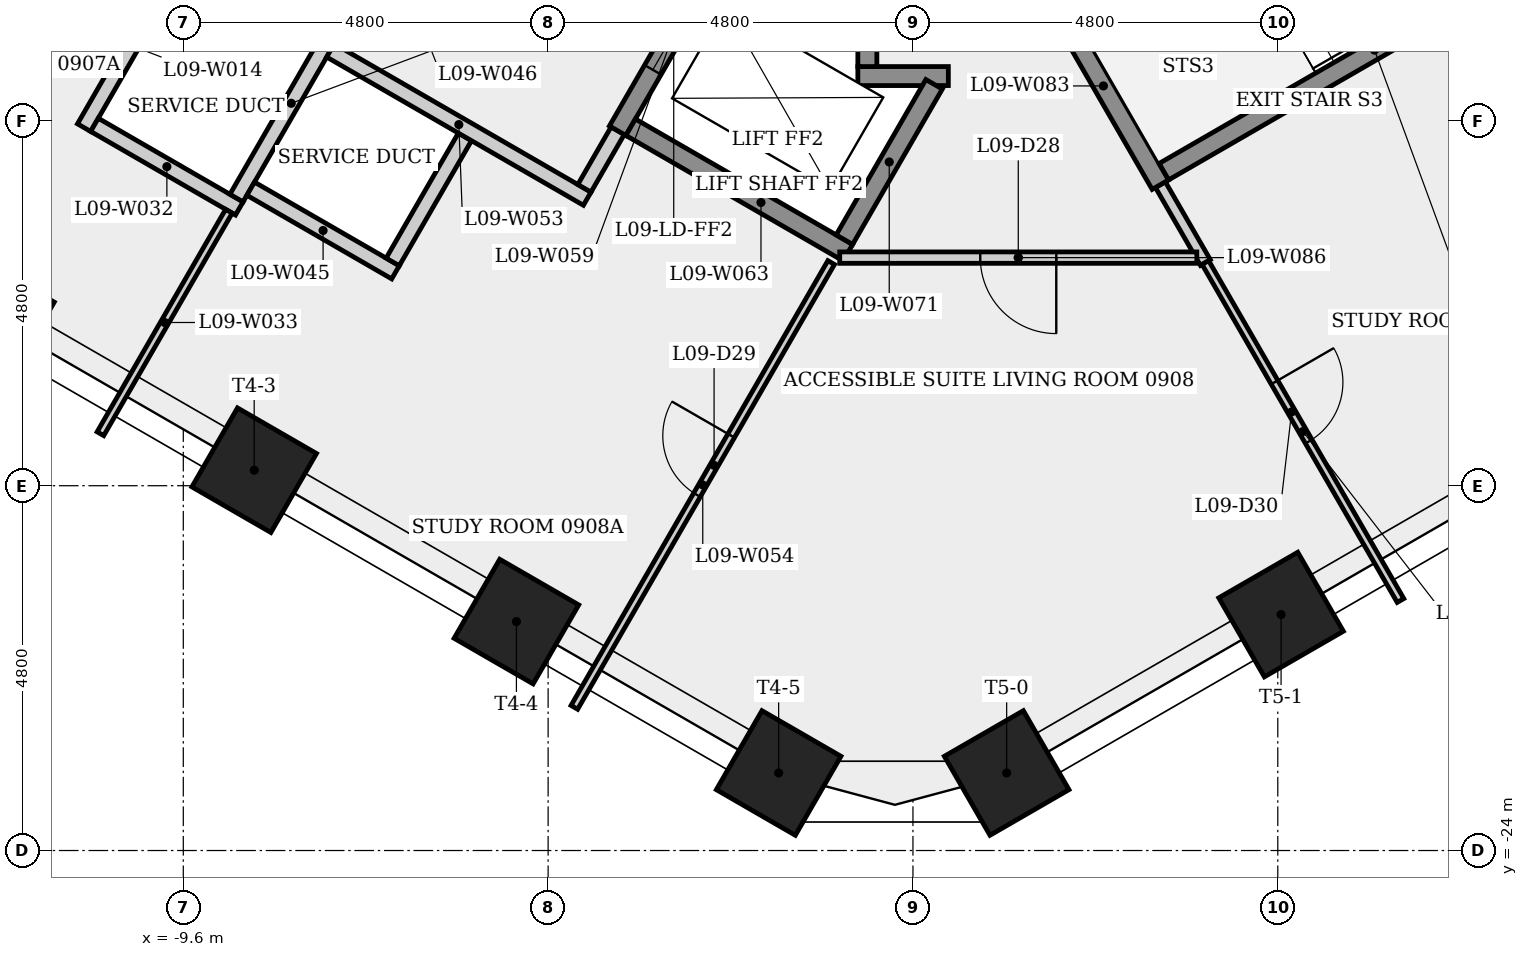
"""IFC4 building model, lengths in metres.
Left out: names, types, materials, properties, quantities, classifications, styles, units other than length and angle.
Written with IfcOpenShell. Run it as: python <this file> out.ifc"""

import sys

from ifc_helpers import new_model, si_unit, direction, frame, frame_2d, origin, origin_2d, place, context, subcontext, project, spatial, rectangle, extrude, element, fill, save


model = new_model("IFC4")
c1 = context("Model", 3, precision=1e-05, world=origin(), true_north=direction((0.0, 1.0)))
c2 = subcontext(c1, "Body", "Model", "MODEL_VIEW")
j1 = project(units=[si_unit("LENGTHUNIT", "METRE"), si_unit("PLANEANGLEUNIT", "RADIAN")], contexts=[c1])
p1 = place(None, origin())
s1 = spatial("IfcSite", under=j1, at=p1, CompositionType="ELEMENT")
p2 = place(p1, origin())
s2 = spatial("IfcBuilding", under=s1, at=p2, CompositionType="ELEMENT")
p3 = place(p2, frame((0.0, 0.0, 39.1)))
s3 = spatial("IfcBuildingStorey", under=s2, at=p3, CompositionType="ELEMENT", Elevation=39.1)
for number, where, z_axis, x_axis in (
    (1, (-12.117, -17.004, 0.0), (0.0, 0.0, 1.0), (-0.5, -0.866, 0.0)),
    (2, (-8.667, -18.996, 0.0), (0.0, 0.0, 1.0), (-0.5, -0.866, 0.0)),
    (3, (-5.217, -20.988, 0.0), (0.0, 0.0, 1.0), (-0.5, -0.866, 0.0)),
    (4, (-1.767, -22.98, 0.0), (0.0, 0.0, 1.0), (-0.5, -0.866, 0.0)),
    (5, (1.233, -22.98, 0.0), (0.0, 0.0, 1.0), (0.5, -0.866, 0.0)),
    (6, (4.843, -20.895, 0.0), (0.0, 0.0, 1.0), (0.5, -0.866, 0.0)),
):
    element("IfcColumn", number, at=place(p3, frame(where, z_axis=z_axis, x_axis=x_axis)), inside=s3, PredefinedType="COLUMN", context=c2, shape_type="SweptSolid", body=[
        extrude(rectangle(XDim=1.2, YDim=1.2, at=origin_2d()), origin(), (0.0, 0.0, 1.0), 3.4),
    ])
p4 = place(p3, frame((-10.905, -14.489, 0.0), z_axis=(0.0, 0.0, 1.0), x_axis=(0.499959856469, 0.866048579423, 0.0)))
e7 = element("IfcWall", 7, at=p4, inside=s3, PredefinedType="PLUMBINGWALL", context=c2, shape_type="SweptSolid", body=[
    extrude(rectangle(XDim=3.175, YDim=0.2, at=frame_2d((1.587, 0.0))), origin(), (0.0, 0.0, 1.0), 3.05),
])
p5 = place(p3, frame((-8.863, -15.552, 0.0), z_axis=(0.0, 0.0, 1.0), x_axis=(-0.866035918664, 0.499981787252, 0.0)))
e8 = element("IfcWall", 8, at=p5, inside=s3, PredefinedType="PLUMBINGWALL", context=c2, shape_type="SweptSolid", body=[
    extrude(rectangle(XDim=2.2, YDim=0.2, at=frame_2d((1.1, 0.0))), origin(), (0.0, 0.0, 1.0), 3.05),
])
p6 = place(p3, frame((-9.0, -15.588, 0.0), z_axis=(0.0, 0.0, 1.0), x_axis=(-0.499968344795, -0.866043679154, 0.0)))
e9 = element("IfcWall", 9, at=p6, inside=s3, PredefinedType="PARTITIONING", context=c2, shape_type="SweptSolid", body=[
    extrude(rectangle(XDim=3.381, YDim=0.1, at=frame_2d((1.69, 0.0))), origin(), (0.0, 0.0, 1.0), 3.05),
])
p7 = place(p3, frame((-7.7, -13.337, 0.0), z_axis=(0.0, 0.0, 1.0), x_axis=(-0.500001309137, -0.866024647952, 0.0)))
e10 = element("IfcWall", 10, at=p7, inside=s3, PredefinedType="PLUMBINGWALL", context=c2, shape_type="SweptSolid", body=[
    extrude(rectangle(XDim=2.4, YDim=0.2, at=frame_2d((1.2, 0.0))), origin(), (0.0, 0.0, 1.0), 3.05),
])
p8 = place(p3, frame((-6.808, -16.392, 0.0), z_axis=(0.0, 0.0, 1.0), x_axis=(-0.866008176907, 0.50002983664, 0.0)))
e11 = element("IfcWall", 11, at=p8, inside=s3, PredefinedType="PLUMBINGWALL", context=c2, shape_type="SweptSolid", body=[
    extrude(rectangle(XDim=2.2, YDim=0.2, at=frame_2d((1.1, 0.0))), origin(), (0.0, 0.0, 1.0), 3.05),
])
p9 = place(p3, frame((-5.895, -14.61, 0.0), z_axis=(0.0, 0.0, 1.0), x_axis=(-0.500022797313, -0.86601224135, 0.0)))
e12 = element("IfcWall", 12, at=p9, inside=s3, PredefinedType="PLUMBINGWALL", context=c2, shape_type="SweptSolid", body=[
    extrude(rectangle(XDim=1.9, YDim=0.2, at=frame_2d((0.95, 0.0))), origin(), (0.0, 0.0, 1.0), 3.05),
])
p10 = place(p3, frame((-4.286, -15.423, 0.0), z_axis=(0.0, 0.0, 1.0), x_axis=(-0.866042777325, 0.499969906938, 0.0)))
e13 = element("IfcWall", 13, at=p10, inside=s3, PredefinedType="PARTITIONING", context=c2, shape_type="SweptSolid", body=[
    extrude(rectangle(XDim=3.9, YDim=0.2, at=frame_2d((1.95, 0.0))), origin(), (0.0, 0.0, 1.0), 3.05),
])
p11 = place(p3, frame((-4.455, -22.116, 0.0), z_axis=(0.0, 0.0, 1.0), x_axis=(0.499982026803, 0.866035780366, 0.0)))
e14 = element("IfcWall", 14, at=p11, inside=s3, PredefinedType="PARTITIONING", context=c2, shape_type="SweptSolid", body=[
    extrude(rectangle(XDim=6.758, YDim=0.1, at=frame_2d((3.379, 0.0))), origin(), (0.0, 0.0, 1.0), 3.05),
])
p12 = place(p11, frame((3.227, 0.0, 0.0)))
e15 = element("IfcOpeningElement", 15, at=p12, cuts=e14, PredefinedType="OPENING", context=c2, shape_type="SweptSolid", body=[
    extrude(rectangle(XDim=0.9, YDim=2.1, at=frame_2d((0.45, 1.05))), frame((0.0, 0.06, 0.0), z_axis=(0.0, -1.0, 0.0), x_axis=(1.0, 0.0, 0.0)), (0.0, 0.0, 1.0), 0.12),
])
p13 = place(p3, frame((-3.885, -14.529, 0.0), z_axis=(0.0, 0.0, 1.0), x_axis=(-0.499859285417, -0.866106630146, 0.0)))
e16 = element("IfcWall", 16, at=p13, inside=s3, PredefinedType="PARTITIONING", context=c2, shape_type="SweptSolid", body=[
    extrude(rectangle(XDim=0.875, YDim=0.2, at=frame_2d((0.438, 0.0))), origin(), (0.0, 0.0, 1.0), 3.05),
])
p14 = place(p3, frame((-2.41, -11.974, 0.0), z_axis=(0.0, 0.0, 1.0), x_axis=(-0.500001826776, -0.866024349092, 0.0)))
e17 = element("IfcWall", 17, at=p14, inside=s3, PredefinedType="SHEAR", context=c2, shape_type="SweptSolid", body=[
    extrude(rectangle(XDim=2.95, YDim=0.25, at=frame_2d((1.475, 0.0))), origin(), (0.0, 0.0, 1.0), 3.05),
])
p15 = place(p14, frame((0.925, 0.0, 0.0)))
e18 = element("IfcOpeningElement", 18, at=p15, cuts=e17, PredefinedType="OPENING", context=c2, shape_type="SweptSolid", body=[
    extrude(rectangle(XDim=1.1, YDim=2.1, at=frame_2d((0.55, 1.05))), frame((0.0, 0.135, 0.0), z_axis=(0.0, -1.0, 0.0), x_axis=(1.0, 0.0, 0.0)), (0.0, 0.0, 1.0), 0.27),
])
p16 = place(p3, frame((-0.856, -16.133, 0.0), z_axis=(0.0, 0.0, 1.0), x_axis=(-0.866021716278, 0.500006386895, 0.0)))
e19 = element("IfcWall", 19, at=p16, inside=s3, PredefinedType="SHEAR", context=c2, shape_type="SweptSolid", body=[
    extrude(rectangle(XDim=3.3, YDim=0.25, at=frame_2d((1.65, 0.0))), origin(), (0.0, 0.0, 1.0), 3.05),
])
p17 = place(p3, frame((-0.725, -13.81, 0.0), z_axis=(0.0, 0.0, 1.0), x_axis=(1.0, 0.0, 0.0)))
e20 = element("IfcWall", 20, at=p17, inside=s3, PredefinedType="SHEAR", context=c2, shape_type="SweptSolid", body=[
    extrude(rectangle(XDim=1.191, YDim=0.25, at=frame_2d((0.595, 0.0))), origin(), (0.0, 0.0, 1.0), 3.05),
])
p18 = place(p3, frame((-0.6, -13.289, 0.0), z_axis=(0.0, 0.0, 1.0), x_axis=(0.0, -1.0, 0.0)))
e21 = element("IfcWall", 21, at=p18, inside=s3, PredefinedType="SHEAR", context=c2, shape_type="SweptSolid", body=[
    extrude(rectangle(XDim=0.396, YDim=0.25, at=frame_2d((0.198, 0.0))), origin(), (0.0, 0.0, 1.0), 3.4),
])
p19 = place(p3, frame((0.278, -13.918, 0.0), z_axis=(0.0, 0.0, 1.0), x_axis=(-0.49998806882, -0.866032292145, 0.0)))
e22 = element("IfcWall", 22, at=p19, inside=s3, PredefinedType="SHEAR", context=c2, shape_type="SweptSolid", body=[
    extrude(rectangle(XDim=2.36, YDim=0.25, at=frame_2d((1.18, 0.0))), origin(), (0.0, 0.0, 1.0), 3.4),
])
p20 = place(p3, frame((3.256, -15.239, 0.0), z_axis=(0.0, 0.0, 1.0), x_axis=(0.499954554753, -0.86605164002, 0.0)))
e23 = element("IfcWall", 23, at=p20, inside=s3, PredefinedType="PARTITIONING", context=c2, shape_type="SweptSolid", body=[
    extrude(rectangle(XDim=1.184, YDim=0.15, at=frame_2d((0.592, 0.0))), origin(), (0.0, 0.0, 1.0), 3.05),
])
p21 = place(p3, frame((3.256, -15.239, 0.0), z_axis=(0.0, 0.0, 1.0), x_axis=(-0.50002537861, 0.866010750942, 0.0)))
e24 = element("IfcWall", 24, at=p21, inside=s3, PredefinedType="SHEAR", context=c2, shape_type="SweptSolid", body=[
    extrude(rectangle(XDim=3.0, YDim=0.25, at=frame_2d((1.5, 0.0))), origin(), (0.0, 0.0, 1.0), 3.05),
])
p22 = place(p3, frame((3.735, -16.199, 0.0), z_axis=(0.0, 0.0, 1.0), x_axis=(-1.0, 0.0, 0.0)))
e25 = element("IfcWall", 25, at=p22, inside=s3, PredefinedType="PARTITIONING", context=c2, shape_type="SweptSolid", body=[
    extrude(rectangle(XDim=4.698, YDim=0.15, at=frame_2d((2.349, 0.0))), origin(), (0.0, 0.0, 1.0), 3.05),
])
p23 = place(p22, frame((1.849, 0.0, 0.0)))
e26 = element("IfcOpeningElement", 26, at=p23, cuts=e25, PredefinedType="OPENING", context=c2, shape_type="SweptSolid", body=[
    extrude(rectangle(XDim=1.0, YDim=2.1, at=frame_2d((0.5, 1.05))), frame((0.0, 0.085, 0.0), z_axis=(0.0, -1.0, 0.0), x_axis=(1.0, 0.0, 0.0)), (0.0, 0.0, 1.0), 0.17),
])
p24 = place(p3, frame((3.847, -16.264, 0.0), z_axis=(0.0, 0.0, 1.0), x_axis=(0.50000507078, -0.866022476149, 0.0)))
e27 = element("IfcWall", 27, at=p24, inside=s3, PredefinedType="PARTITIONING", context=c2, shape_type="SweptSolid", body=[
    extrude(rectangle(XDim=5.135, YDim=0.1, at=frame_2d((2.567, 0.0))), origin(), (0.0, 0.0, 1.0), 3.05),
])
p25 = place(p24, frame((1.819, 0.0, 0.0)))
e28 = element("IfcOpeningElement", 28, at=p25, cuts=e27, PredefinedType="OPENING", context=c2, shape_type="SweptSolid", body=[
    extrude(rectangle(XDim=0.9, YDim=2.1, at=frame_2d((0.45, 1.05))), frame((0.0, 0.06, 0.0), z_axis=(0.0, -1.0, 0.0), x_axis=(1.0, 0.0, 0.0)), (0.0, 0.0, 1.0), 0.12),
])
p26 = place(p3, frame((3.301, -15.068, 0.0), z_axis=(0.0, 0.0, 1.0), x_axis=(0.866035036182, 0.499983315828, 0.0)))
e29 = element("IfcWall", 29, at=p26, inside=s3, PredefinedType="SHEAR", context=c2, shape_type="SweptSolid", body=[
    extrude(rectangle(XDim=6.4, YDim=0.25, at=frame_2d((3.2, 0.0))), origin(), (0.0, 0.0, 1.0), 3.05),
])
p27 = place(p15, origin())
e30 = element("IfcDoor", 30, at=p27, inside=s3, OperationType="SLIDING_TO_LEFT", PredefinedType="DOOR", context=c2, shape_type="SweptSolid", body=[
    extrude(rectangle(XDim=1.1, YDim=2.1, at=frame_2d((0.55, 1.05))), frame((0.0, 0.025, 0.0), z_axis=(0.0, -1.0, 0.0), x_axis=(1.0, 0.0, 0.0)), (0.0, 0.0, 1.0), 0.05),
])
fill(e18, e30)
p28 = place(p23, origin())
e31 = element("IfcDoor", 31, at=p28, inside=s3, OperationType="SINGLE_SWING_LEFT", PredefinedType="DOOR", context=c2, shape_type="SweptSolid", body=[
    extrude(rectangle(XDim=1.0, YDim=2.1, at=frame_2d((0.5, 1.05))), frame((0.0, 0.025, 0.0), z_axis=(0.0, -1.0, 0.0), x_axis=(1.0, 0.0, 0.0)), (0.0, 0.0, 1.0), 0.05),
])
fill(e26, e31)
p29 = place(p12, origin())
e32 = element("IfcDoor", 32, at=p29, inside=s3, OperationType="SINGLE_SWING_RIGHT", PredefinedType="DOOR", context=c2, shape_type="SweptSolid", body=[
    extrude(rectangle(XDim=0.9, YDim=2.1, at=frame_2d((0.45, 1.05))), frame((0.0, 0.025, 0.0), z_axis=(0.0, -1.0, 0.0), x_axis=(1.0, 0.0, 0.0)), (0.0, 0.0, 1.0), 0.05),
])
fill(e15, e32)
p30 = place(p25, origin())
e33 = element("IfcDoor", 33, at=p30, inside=s3, OperationType="SINGLE_SWING_LEFT", PredefinedType="DOOR", context=c2, shape_type="SweptSolid", body=[
    extrude(rectangle(XDim=0.9, YDim=2.1, at=frame_2d((0.45, 1.05))), frame((0.0, 0.025, 0.0), z_axis=(0.0, -1.0, 0.0), x_axis=(1.0, 0.0, 0.0)), (0.0, 0.0, 1.0), 0.05),
])
fill(e28, e33)
save(model, sys.argv[1])
